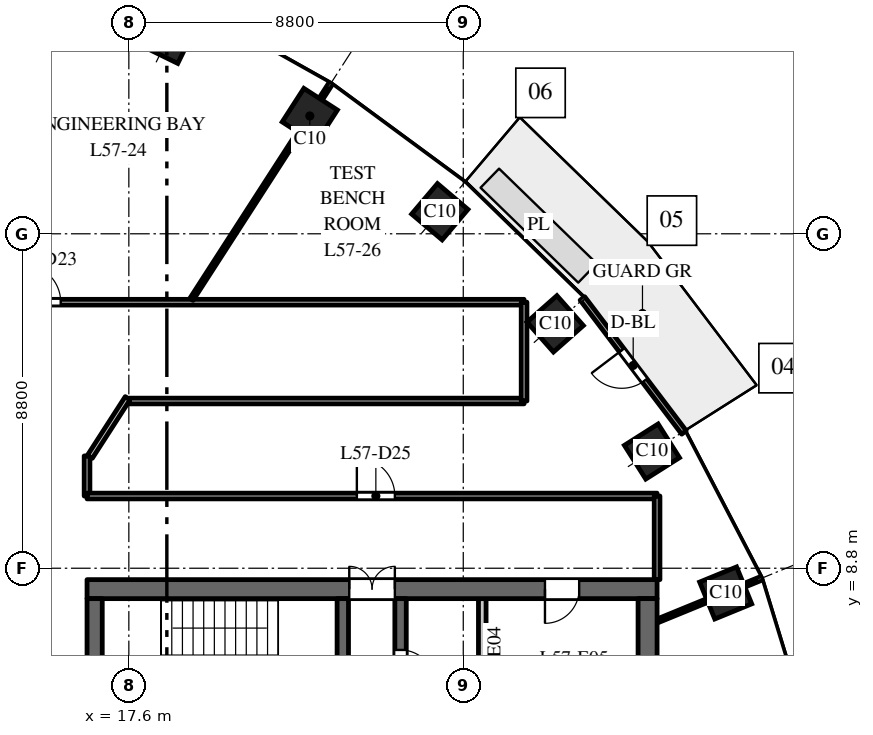
"""IFC4 building model, lengths in metres.
Left out: names, types, materials, properties, quantities, classifications, styles, units other than length and angle.
Written with IfcOpenShell. Run it as: python <this file> out.ifc"""

import sys

from ifc_helpers import new_model, si_unit, direction, frame, frame_2d, origin, origin_2d, place, context, subcontext, project, spatial, rectangle, extrude, element, fill, save


model = new_model("IFC4")
c1 = context("Model", 3, precision=1e-05, world=origin(), true_north=direction((0.0, 1.0)))
c2 = subcontext(c1, "Body", "Model", "MODEL_VIEW")
j1 = project(units=[si_unit("LENGTHUNIT", "METRE"), si_unit("PLANEANGLEUNIT", "RADIAN")], contexts=[c1])
p1 = place(None, origin())
s1 = spatial("IfcSite", under=j1, at=p1, CompositionType="ELEMENT")
p2 = place(p1, origin())
s2 = spatial("IfcBuilding", under=s1, at=p2, CompositionType="ELEMENT")
p3 = place(p2, frame((0.0, 0.0, 269.5)))
s3 = spatial("IfcBuildingStorey", under=s2, at=p3, CompositionType="ELEMENT", Elevation=269.5)
for number, where, z_axis, x_axis in (
    (1, (33.305, 8.149, 0.0), (0.0, 0.0, 1.0), (-0.379, 0.925, 0.0)),
    (2, (31.365, 11.871, 0.0), (0.0, 0.0, 1.0), (-0.535, 0.845, 0.0)),
    (3, (28.819, 15.23, 0.0), (0.0, 0.0, 1.0), (-0.663, 0.749, 0.0)),
    (4, (25.783, 18.18, 0.0), (0.0, 0.0, 1.0), (-0.763, 0.646, 0.0)),
    (5, (22.362, 20.7, 0.0), (0.0, 0.0, 1.0), (-0.84, 0.542, 0.0)),
    (6, (18.646, 22.785, 0.0), (0.0, 0.0, 1.0), (-0.898, 0.439, 0.0)),
):
    element("IfcColumn", number, at=place(p3, frame(where, z_axis=z_axis, x_axis=x_axis)), inside=s3, PredefinedType="COLUMN", context=c2, shape_type="SweptSolid", body=[
        extrude(rectangle(XDim=1.05, YDim=1.05, at=origin_2d()), origin(), (0.0, 0.0, 1.0), 4.0),
    ])
p4 = place(p3, frame((16.5, 8.25, 0.0), z_axis=(0.0, 0.0, 1.0), x_axis=(1.0, 0.0, 0.0)))
e7 = element("IfcWall", 7, at=p4, inside=s3, PredefinedType="SHEAR", context=c2, shape_type="SweptSolid", body=[
    extrude(rectangle(XDim=15.0, YDim=0.5, at=frame_2d((7.5, 0.0))), origin(), (0.0, 0.0, 1.0), 3.7),
])
p5 = place(p4, frame((6.9, 0.0, 0.0)))
e8 = element("IfcOpeningElement", 8, at=p5, cuts=e7, PredefinedType="OPENING", context=c2, shape_type="SweptSolid", body=[
    extrude(rectangle(XDim=1.2, YDim=2.1, at=frame_2d((0.6, 1.05))), frame((0.0, 0.26, 0.0), z_axis=(0.0, -1.0, 0.0), x_axis=(1.0, 0.0, 0.0)), (0.0, 0.0, 1.0), 0.52),
])
p6 = place(p4, frame((12.05, 0.0, 0.0)))
e9 = element("IfcOpeningElement", 9, at=p6, cuts=e7, PredefinedType="OPENING", context=c2, shape_type="SweptSolid", body=[
    extrude(rectangle(XDim=0.9, YDim=2.1, at=frame_2d((0.45, 1.05))), frame((0.0, 0.26, 0.0), z_axis=(0.0, -1.0, 0.0), x_axis=(1.0, 0.0, 0.0)), (0.0, 0.0, 1.0), 0.52),
])
p7 = place(p3, frame((24.75, -8.0, 0.0), z_axis=(0.0, 0.0, 1.0), x_axis=(0.0, 1.0, 0.0)))
e10 = element("IfcWall", 10, at=p7, inside=s3, PredefinedType="SHEAR", context=c2, shape_type="SweptSolid", body=[
    extrude(rectangle(XDim=16.0, YDim=0.3, at=frame_2d((8.0, 0.0))), origin(), (0.0, 0.0, 1.0), 3.7),
])
p8 = place(p7, frame((4.425, 0.0, 0.0)))
e11 = element("IfcOpeningElement", 11, at=p8, cuts=e10, PredefinedType="OPENING", context=c2, shape_type="SweptSolid", body=[
    extrude(rectangle(XDim=1.1, YDim=2.1, at=frame_2d((0.55, 1.05))), frame((0.0, 0.16, 0.0), z_axis=(0.0, -1.0, 0.0), x_axis=(1.0, 0.0, 0.0)), (0.0, 0.0, 1.0), 0.32),
])
p9 = place(p7, frame((7.45, 0.0, 0.0)))
e12 = element("IfcOpeningElement", 12, at=p9, cuts=e10, PredefinedType="OPENING", context=c2, shape_type="SweptSolid", body=[
    extrude(rectangle(XDim=1.1, YDim=2.1, at=frame_2d((0.55, 1.05))), frame((0.0, 0.16, 0.0), z_axis=(0.0, -1.0, 0.0), x_axis=(1.0, 0.0, 0.0)), (0.0, 0.0, 1.0), 0.32),
])
p10 = place(p7, frame((10.475, 0.0, 0.0)))
e13 = element("IfcOpeningElement", 13, at=p10, cuts=e10, PredefinedType="OPENING", context=c2, shape_type="SweptSolid", body=[
    extrude(rectangle(XDim=1.1, YDim=2.1, at=frame_2d((0.55, 1.05))), frame((0.0, 0.16, 0.0), z_axis=(0.0, -1.0, 0.0), x_axis=(1.0, 0.0, 0.0)), (0.0, 0.0, 1.0), 0.32),
])
p11 = place(p7, frame((13.75, 0.0, 0.0)))
e14 = element("IfcOpeningElement", 14, at=p11, cuts=e10, PredefinedType="OPENING", context=c2, shape_type="SweptSolid", body=[
    extrude(rectangle(XDim=0.9, YDim=2.1, at=frame_2d((0.45, 1.05))), frame((0.0, 0.16, 0.0), z_axis=(0.0, -1.0, 0.0), x_axis=(1.0, 0.0, 0.0)), (0.0, 0.0, 1.0), 0.32),
])
p12 = place(p7, frame((1.35, 0.0, 0.0)))
e15 = element("IfcOpeningElement", 15, at=p12, cuts=e10, PredefinedType="OPENING", context=c2, shape_type="SweptSolid", body=[
    extrude(rectangle(XDim=0.9, YDim=2.1, at=frame_2d((0.45, 1.05))), frame((0.0, 0.16, 0.0), z_axis=(0.0, -1.0, 0.0), x_axis=(1.0, 0.0, 0.0)), (0.0, 0.0, 1.0), 0.32),
])
p13 = place(p3, frame((16.7, -8.0, 0.0), z_axis=(0.0, 0.0, 1.0), x_axis=(0.0, 1.0, 0.0)))
e16 = element("IfcWall", 16, at=p13, inside=s3, PredefinedType="SHEAR", context=c2, shape_type="SweptSolid", body=[
    extrude(rectangle(XDim=16.0, YDim=0.4, at=frame_2d((8.0, 0.0))), origin(), (0.0, 0.0, 1.0), 3.7),
])
p14 = place(p3, frame((31.25, -8.0, 0.0), z_axis=(0.0, 0.0, 1.0), x_axis=(0.0, 1.0, 0.0)))
e17 = element("IfcWall", 17, at=p14, inside=s3, PredefinedType="SHEAR", context=c2, shape_type="SweptSolid", body=[
    extrude(rectangle(XDim=16.0, YDim=0.5, at=frame_2d((8.0, 0.0))), origin(), (0.0, 0.0, 1.0), 3.7),
])
p15 = place(p3, frame((26.9, 4.75, 0.0), z_axis=(0.0, 0.0, 1.0), x_axis=(0.0, 1.0, 0.0)))
e18 = element("IfcWall", 18, at=p15, inside=s3, PredefinedType="PARTITIONING", context=c2, shape_type="SweptSolid", body=[
    extrude(rectangle(XDim=3.25, YDim=0.2, at=frame_2d((1.625, 0.0))), origin(), (0.0, 0.0, 1.0), 3.7),
])
p16 = place(p3, frame((23.23, 2.25, 0.0), z_axis=(0.0, 0.0, 1.0), x_axis=(0.0, 1.0, 0.0)))
e19 = element("IfcWall", 19, at=p16, inside=s3, PredefinedType="SHEAR", context=c2, shape_type="SweptSolid", body=[
    extrude(rectangle(XDim=5.75, YDim=0.3, at=frame_2d((2.875, 0.0))), origin(), (0.0, 0.0, 1.0), 3.7),
])
p17 = place(p16, frame((0.6, 0.0, 0.0)))
e20 = element("IfcOpeningElement", 20, at=p17, cuts=e19, PredefinedType="OPENING", context=c2, shape_type="SweptSolid", body=[
    extrude(rectangle(XDim=1.0, YDim=2.1, at=frame_2d((0.5, 1.05))), frame((0.0, 0.16, 0.0), z_axis=(0.0, -1.0, 0.0), x_axis=(1.0, 0.0, 0.0)), (0.0, 0.0, 1.0), 0.32),
])
p18 = place(p3, frame((32.208, 12.374, 0.0), z_axis=(0.0, 0.0, 1.0), x_axis=(-0.604045763106, 0.796949632081, 0.0)))
e21 = element("IfcWall", 21, at=p18, inside=s3, PredefinedType="STANDARD", context=c2, shape_type="SweptSolid", body=[
    extrude(rectangle(XDim=4.423, YDim=0.15, at=frame_2d((2.212, 0.0))), origin(), (0.0, 0.0, 1.0), 3.7),
])
p19 = place(p18, frame((1.712, 0.0, 0.0)))
e22 = element("IfcOpeningElement", 22, at=p19, cuts=e21, PredefinedType="OPENING", context=c2, shape_type="SweptSolid", body=[
    extrude(rectangle(XDim=1.0, YDim=2.4, at=frame_2d((0.5, 1.2))), frame((0.0, 0.085, 0.0), z_axis=(0.0, -1.0, 0.0), x_axis=(1.0, 0.0, 0.0)), (0.0, 0.0, 1.0), 0.17),
])
p20 = place(p3, frame((11.614, 15.8, 0.0), z_axis=(0.0, 0.0, 1.0), x_axis=(1.0, 0.0, 0.0)))
e23 = element("IfcWall", 23, at=p20, inside=s3, PredefinedType="PARTITIONING", context=c2, shape_type="SweptSolid", body=[
    extrude(rectangle(XDim=16.386, YDim=0.15, at=frame_2d((8.193, 0.0))), origin(), (0.0, 0.0, 1.0), 3.0),
])
p21 = place(p20, frame((3.193, 0.0, 0.0)))
e24 = element("IfcOpeningElement", 24, at=p21, cuts=e23, PredefinedType="OPENING", context=c2, shape_type="SweptSolid", body=[
    extrude(rectangle(XDim=1.0, YDim=2.1, at=frame_2d((0.5, 1.05))), frame((0.0, 0.085, 0.0), z_axis=(0.0, -1.0, 0.0), x_axis=(1.0, 0.0, 0.0)), (0.0, 0.0, 1.0), 0.17),
])
p22 = place(p3, frame((16.5, 10.7, 0.0), z_axis=(0.0, 0.0, 1.0), x_axis=(0.0, 1.0, 0.0)))
e25 = element("IfcWall", 25, at=p22, inside=s3, PredefinedType="PARTITIONING", context=c2, shape_type="SweptSolid", body=[
    extrude(rectangle(XDim=1.055, YDim=0.15, at=frame_2d((0.527, 0.0))), origin(), (0.0, 0.0, 1.0), 3.7),
])
p23 = place(p3, frame((16.5, 10.7, 0.0), z_axis=(0.0, 0.0, 1.0), x_axis=(1.0, 0.0, 0.0)))
e26 = element("IfcWall", 26, at=p23, inside=s3, PredefinedType="PARTITIONING", context=c2, shape_type="SweptSolid", body=[
    extrude(rectangle(XDim=15.0, YDim=0.15, at=frame_2d((7.5, 0.0))), origin(), (0.0, 0.0, 1.0), 2.75),
])
p24 = place(p23, frame((7.1, 0.0, 0.0)))
e27 = element("IfcOpeningElement", 27, at=p24, cuts=e26, PredefinedType="OPENING", context=c2, shape_type="SweptSolid", body=[
    extrude(rectangle(XDim=1.0, YDim=2.1, at=frame_2d((0.5, 1.05))), frame((0.0, 0.085, 0.0), z_axis=(0.0, -1.0, 0.0), x_axis=(1.0, 0.0, 0.0)), (0.0, 0.0, 1.0), 0.17),
])
p25 = place(p3, frame((16.575, 11.733, 0.0), z_axis=(0.0, 0.0, 1.0), x_axis=(0.541860116324, 0.840468687304, 0.0)))
e28 = element("IfcWall", 28, at=p25, inside=s3, PredefinedType="PARTITIONING", context=c2, shape_type="SweptSolid", body=[
    extrude(rectangle(XDim=1.835, YDim=0.15, at=frame_2d((0.917, 0.0))), origin(), (0.0, 0.0, 1.0), 3.7),
])
p26 = place(p3, frame((17.61, 13.2, 0.0), z_axis=(0.0, 0.0, 1.0), x_axis=(1.0, 0.0, 0.0)))
e29 = element("IfcWall", 29, at=p26, inside=s3, PredefinedType="PARTITIONING", context=c2, shape_type="SweptSolid", body=[
    extrude(rectangle(XDim=10.39, YDim=0.15, at=frame_2d((5.195, 0.0))), origin(), (0.0, 0.0, 1.0), 2.75),
])
p27 = place(p3, frame((19.248, 15.875, 0.0), z_axis=(0.0, 0.0, 1.0), x_axis=(0.542216737844, 0.840238662049, 0.0)))
e30 = element("IfcWall", 30, at=p27, inside=s3, PredefinedType="PARTITIONING", context=c2, shape_type="SweptSolid", body=[
    extrude(rectangle(XDim=6.744, YDim=0.1, at=frame_2d((3.372, 0.0))), origin(), (0.0, 0.0, 1.0), 3.7),
])
p28 = place(p3, frame((28.0, 13.2, 0.0), z_axis=(0.0, 0.0, 1.0), x_axis=(0.0, 1.0, 0.0)))
e31 = element("IfcWall", 31, at=p28, inside=s3, PredefinedType="PARTITIONING", context=c2, shape_type="SweptSolid", body=[
    extrude(rectangle(XDim=2.6, YDim=0.15, at=frame_2d((1.3, 0.0))), origin(), (0.0, 0.0, 1.0), 2.75),
])
p29 = place(p3, frame((31.5, 7.41, 0.0), z_axis=(0.0, 0.0, 1.0), x_axis=(0.925344112436, 0.379128307542, 0.0)))
e32 = element("IfcWall", 32, at=p29, inside=s3, PredefinedType="PARTITIONING", context=c2, shape_type="SweptSolid", body=[
    extrude(rectangle(XDim=2.954, YDim=0.1, at=frame_2d((1.477, 0.0))), origin(), (0.0, 0.0, 1.0), 3.2),
])
p30 = place(p3, frame((31.5, 8.5, 0.0), z_axis=(0.0, 0.0, 1.0), x_axis=(0.0, 1.0, 0.0)))
e33 = element("IfcWall", 33, at=p30, inside=s3, PredefinedType="PARTITIONING", context=c2, shape_type="SweptSolid", body=[
    extrude(rectangle(XDim=2.2, YDim=0.15, at=frame_2d((1.1, 0.0))), origin(), (0.0, 0.0, 1.0), 3.0),
])
p31 = place(p5, origin())
e34 = element("IfcDoor", 34, at=p31, inside=s3, OperationType="DOUBLE_DOOR_DOUBLE_SWING", PredefinedType="DOOR", context=c2, shape_type="SweptSolid", body=[
    extrude(rectangle(XDim=1.2, YDim=2.1, at=frame_2d((0.6, 1.05))), frame((0.0, 0.025, 0.0), z_axis=(0.0, -1.0, 0.0), x_axis=(1.0, 0.0, 0.0)), (0.0, 0.0, 1.0), 0.05),
])
fill(e8, e34)
p32 = place(p11, origin())
e35 = element("IfcDoor", 35, at=p32, inside=s3, OperationType="SINGLE_SWING_LEFT", PredefinedType="DOOR", context=c2, shape_type="SweptSolid", body=[
    extrude(rectangle(XDim=0.9, YDim=2.1, at=frame_2d((0.45, 1.05))), frame((0.0, 0.025, 0.0), z_axis=(0.0, -1.0, 0.0), x_axis=(1.0, 0.0, 0.0)), (0.0, 0.0, 1.0), 0.05),
])
fill(e14, e35)
p33 = place(p6, origin())
e36 = element("IfcDoor", 36, at=p33, inside=s3, OperationType="SINGLE_SWING_LEFT", PredefinedType="DOOR", context=c2, shape_type="SweptSolid", body=[
    extrude(rectangle(XDim=0.9, YDim=2.1, at=frame_2d((0.45, 1.05))), frame((0.0, 0.025, 0.0), z_axis=(0.0, -1.0, 0.0), x_axis=(1.0, 0.0, 0.0)), (0.0, 0.0, 1.0), 0.05),
])
fill(e9, e36)
p34 = place(p19, origin())
e37 = element("IfcDoor", 37, at=p34, inside=s3, OperationType="SINGLE_SWING_RIGHT", PredefinedType="DOOR", context=c2, shape_type="SweptSolid", body=[
    extrude(rectangle(XDim=1.0, YDim=2.4, at=frame_2d((0.5, 1.2))), frame((0.0, 0.025, 0.0), z_axis=(0.0, -1.0, 0.0), x_axis=(1.0, 0.0, 0.0)), (0.0, 0.0, 1.0), 0.05),
])
fill(e22, e37)
p35 = place(p21, origin())
e38 = element("IfcDoor", 38, at=p35, inside=s3, OperationType="SINGLE_SWING_LEFT", PredefinedType="DOOR", context=c2, shape_type="SweptSolid", body=[
    extrude(rectangle(XDim=1.0, YDim=2.1, at=frame_2d((0.5, 1.05))), frame((0.0, 0.025, 0.0), z_axis=(0.0, -1.0, 0.0), x_axis=(1.0, 0.0, 0.0)), (0.0, 0.0, 1.0), 0.05),
])
fill(e24, e38)
p36 = place(p24, origin())
e39 = element("IfcDoor", 39, at=p36, inside=s3, OperationType="SINGLE_SWING_LEFT", PredefinedType="DOOR", context=c2, shape_type="SweptSolid", body=[
    extrude(rectangle(XDim=1.0, YDim=2.1, at=frame_2d((0.5, 1.05))), frame((0.0, 0.025, 0.0), z_axis=(0.0, -1.0, 0.0), x_axis=(1.0, 0.0, 0.0)), (0.0, 0.0, 1.0), 0.05),
])
fill(e27, e39)
save(model, sys.argv[1])
